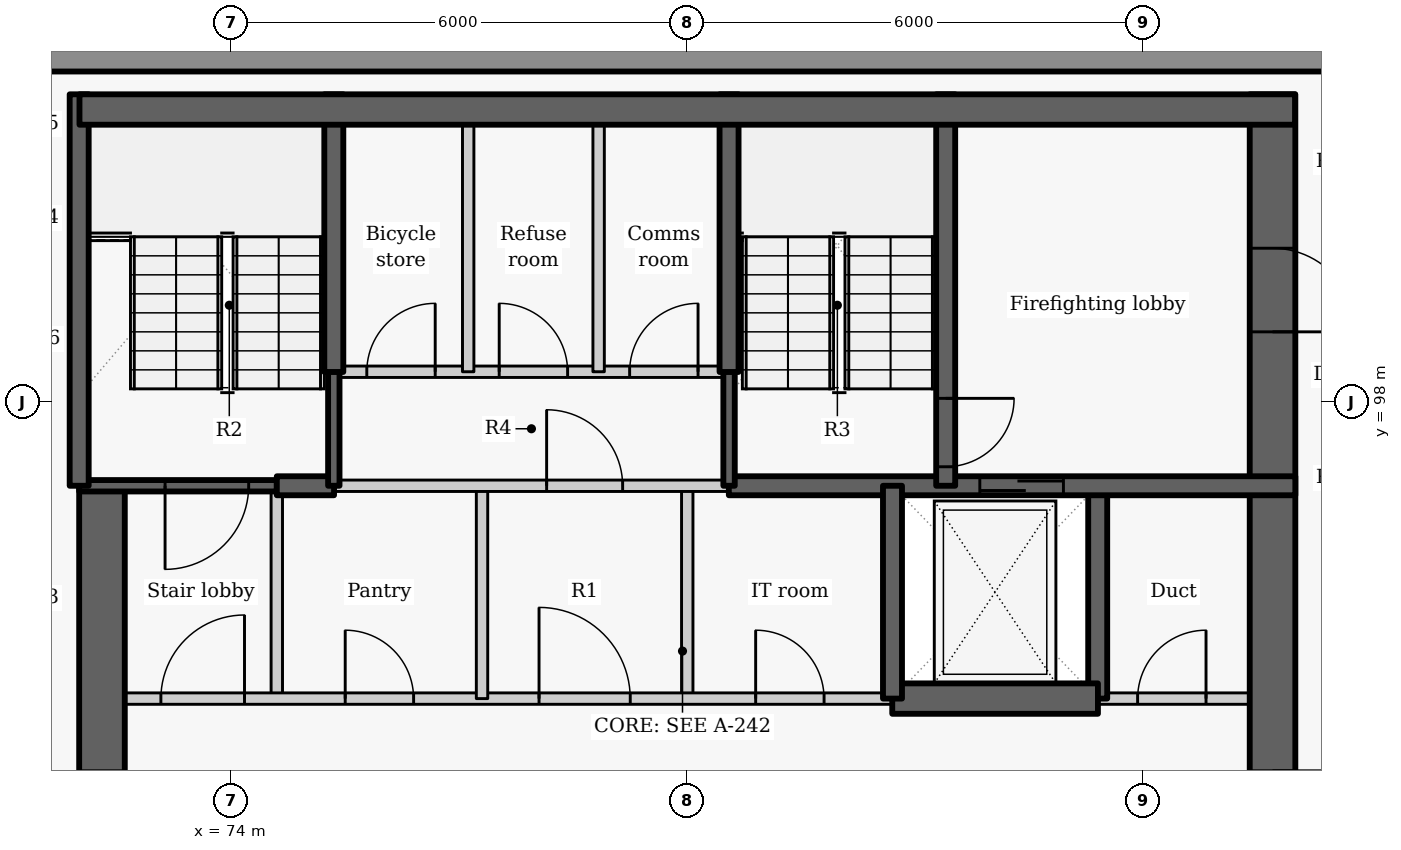
"""IFC4 building model, lengths in metres.
Left out: names, types, materials, properties, quantities, classifications, styles, units other than length and angle.
Written with IfcOpenShell. Run it as: python <this file> out.ifc"""

import sys

from ifc_helpers import new_model, si_unit, direction, frame, frame_2d, origin, place, context, subcontext, project, spatial, rectangle, extrude, element, fill, save


model = new_model("IFC4")
c1 = context("Model", 3, precision=1e-05, world=origin(), true_north=direction((0.0, 1.0)))
c2 = subcontext(c1, "Body", "Model", "MODEL_VIEW")
j1 = project(units=[si_unit("LENGTHUNIT", "METRE"), si_unit("PLANEANGLEUNIT", "RADIAN")], contexts=[c1])
p1 = place(None, origin())
s1 = spatial("IfcSite", under=j1, at=p1, CompositionType="ELEMENT")
p2 = place(p1, origin())
s2 = spatial("IfcBuilding", under=s1, at=p2, CompositionType="ELEMENT")
p3 = place(p2, frame((0.0, 0.0, 249.3)))
s3 = spatial("IfcBuildingStorey", under=s2, at=p3, CompositionType="ELEMENT", Elevation=249.3)
p4 = place(p3, frame((89.499, 102.5, 0.0), z_axis=(0.0, 0.0, 1.0), x_axis=(-1.0, 0.0, 0.0)))
e1 = element("IfcWall", 1, at=p4, inside=s3, PredefinedType="SOLIDWALL", context=c2, shape_type="SweptSolid", body=[
    extrude(rectangle(XDim=19.033, YDim=0.3, at=frame_2d((9.517, 0.0))), origin(), (0.0, 0.0, 1.0), 2.425),
])
p5 = place(p3, frame((74.6, 94.1, 0.0), z_axis=(0.0, 0.0, 1.0), x_axis=(0.0, 1.0, 0.0)))
e2 = element("IfcWall", 2, at=p5, inside=s3, PredefinedType="PARTITIONING", context=c2, shape_type="SweptSolid", body=[
    extrude(rectangle(XDim=2.8, YDim=0.15, at=frame_2d((1.4, 0.0))), origin(), (0.0, 0.0, 1.0), 3.025),
])
p6 = place(p3, frame((72.3, 87.8, -0.275), z_axis=(0.0, 0.0, 1.0), x_axis=(0.0, 1.0, 0.0)))
e3 = element("IfcWall", 3, at=p6, inside=s3, PredefinedType="SHEAR", context=c2, shape_type="SweptSolid", body=[
    extrude(rectangle(XDim=9.1, YDim=0.6, at=frame_2d((4.55, 0.0))), origin(), (0.0, 0.0, 1.0), 3.3),
])
p7 = place(p6, frame((3.85, 0.0, 0.275)))
e4 = element("IfcOpeningElement", 4, at=p7, cuts=e3, PredefinedType="OPENING", context=c2, shape_type="SweptSolid", body=[
    extrude(rectangle(XDim=1.5, YDim=2.1, at=frame_2d((0.75, 1.05))), frame((0.0, 0.31, 0.0), z_axis=(0.0, -1.0, 0.0), x_axis=(1.0, 0.0, 0.0)), (0.0, 0.0, 1.0), 0.62),
])
p8 = place(p3, frame((85.4, 94.1, -0.275), z_axis=(0.0, 0.0, 1.0), x_axis=(0.0, 1.0, 0.0)))
e5 = element("IfcWall", 5, at=p8, inside=s3, PredefinedType="SHEAR", context=c2, shape_type="SweptSolid", body=[
    extrude(rectangle(XDim=2.8, YDim=0.25, at=frame_2d((1.4, 0.0))), origin(), (0.0, 0.0, 1.0), 3.3),
])
p9 = place(p3, frame((87.7, 102.05, -0.275), z_axis=(0.0, 0.0, 1.0), x_axis=(0.0, -1.0, 0.0)))
e6 = element("IfcWall", 6, at=p9, inside=s3, PredefinedType="SHEAR", context=c2, shape_type="SweptSolid", body=[
    extrude(rectangle(XDim=14.25, YDim=0.6, at=frame_2d((7.125, 0.0))), origin(), (0.0, 0.0, 1.0), 3.3),
])
p10 = place(p9, frame((8.9, 0.0, 0.275)))
e7 = element("IfcOpeningElement", 7, at=p10, cuts=e6, PredefinedType="OPENING", context=c2, shape_type="SweptSolid", body=[
    extrude(rectangle(XDim=1.5, YDim=2.1, at=frame_2d((0.75, 1.05))), frame((0.0, 0.31, 0.0), z_axis=(0.0, -1.0, 0.0), x_axis=(1.0, 0.0, 0.0)), (0.0, 0.0, 1.0), 0.62),
])
p11 = place(p9, frame((2.025, 0.0, 0.275)))
e8 = element("IfcOpeningElement", 8, at=p11, cuts=e6, PredefinedType="OPENING", context=c2, shape_type="SweptSolid", body=[
    extrude(rectangle(XDim=1.1, YDim=2.1, at=frame_2d((0.55, 1.05))), frame((0.0, 0.31, 0.0), z_axis=(0.0, -1.0, 0.0), x_axis=(1.0, 0.0, 0.0)), (0.0, 0.0, 1.0), 0.62),
])
p12 = place(p3, frame((80.0, 94.1, 0.0), z_axis=(0.0, 0.0, 1.0), x_axis=(0.0, 1.0, 0.0)))
e9 = element("IfcWall", 9, at=p12, inside=s3, PredefinedType="PARTITIONING", context=c2, shape_type="SweptSolid", body=[
    extrude(rectangle(XDim=2.8, YDim=0.15, at=frame_2d((1.4, 0.0))), origin(), (0.0, 0.0, 1.0), 3.025),
])
p13 = place(p3, frame((72.0, 94.1, 0.0), z_axis=(0.0, 0.0, 1.0), x_axis=(1.0, 0.0, 0.0)))
e10 = element("IfcWall", 10, at=p13, inside=s3, PredefinedType="PARTITIONING", context=c2, shape_type="SweptSolid", body=[
    extrude(rectangle(XDim=10.703, YDim=0.15, at=frame_2d((5.352, 0.0))), origin(), (0.0, 0.0, 1.0), 3.025),
])
p14 = place(p13, frame((1.075, 0.0, 0.0)))
e11 = element("IfcOpeningElement", 11, at=p14, cuts=e10, PredefinedType="OPENING", context=c2, shape_type="SweptSolid", body=[
    extrude(rectangle(XDim=1.1, YDim=2.1, at=frame_2d((0.55, 1.05))), frame((0.0, 0.085, 0.0), z_axis=(0.0, -1.0, 0.0), x_axis=(1.0, 0.0, 0.0)), (0.0, 0.0, 1.0), 0.17),
])
p15 = place(p13, frame((3.5, 0.0, 0.0)))
e12 = element("IfcOpeningElement", 12, at=p15, cuts=e10, PredefinedType="OPENING", context=c2, shape_type="SweptSolid", body=[
    extrude(rectangle(XDim=0.9, YDim=2.1, at=frame_2d((0.45, 1.05))), frame((0.0, 0.085, 0.0), z_axis=(0.0, -1.0, 0.0), x_axis=(1.0, 0.0, 0.0)), (0.0, 0.0, 1.0), 0.17),
])
p16 = place(p13, frame((6.05, 0.0, 0.0)))
e13 = element("IfcOpeningElement", 13, at=p16, cuts=e10, PredefinedType="OPENING", context=c2, shape_type="SweptSolid", body=[
    extrude(rectangle(XDim=1.2, YDim=2.1, at=frame_2d((0.6, 1.05))), frame((0.0, 0.085, 0.0), z_axis=(0.0, -1.0, 0.0), x_axis=(1.0, 0.0, 0.0)), (0.0, 0.0, 1.0), 0.17),
])
p17 = place(p13, frame((8.9, 0.0, 0.0)))
e14 = element("IfcOpeningElement", 14, at=p17, cuts=e10, PredefinedType="OPENING", context=c2, shape_type="SweptSolid", body=[
    extrude(rectangle(XDim=0.9, YDim=2.1, at=frame_2d((0.45, 1.05))), frame((0.0, 0.085, 0.0), z_axis=(0.0, -1.0, 0.0), x_axis=(1.0, 0.0, 0.0)), (0.0, 0.0, 1.0), 0.17),
])
p18 = place(p3, frame((85.397, 94.1, 0.0), z_axis=(0.0, 0.0, 1.0), x_axis=(1.0, 0.0, 0.0)))
e15 = element("IfcWall", 15, at=p18, inside=s3, PredefinedType="PARTITIONING", context=c2, shape_type="SweptSolid", body=[
    extrude(rectangle(XDim=2.603, YDim=0.15, at=frame_2d((1.302, 0.0))), origin(), (0.0, 0.0, 1.0), 3.025),
])
p19 = place(p18, frame((0.528, 0.0, 0.0)))
e16 = element("IfcOpeningElement", 16, at=p19, cuts=e15, PredefinedType="OPENING", context=c2, shape_type="SweptSolid", body=[
    extrude(rectangle(XDim=0.9, YDim=2.1, at=frame_2d((0.45, 1.05))), frame((0.0, 0.085, 0.0), z_axis=(0.0, -1.0, 0.0), x_axis=(1.0, 0.0, 0.0)), (0.0, 0.0, 1.0), 0.17),
])
p20 = place(p3, frame((82.697, 94.1, -0.275), z_axis=(0.0, 0.0, 1.0), x_axis=(1.0, 0.0, 0.0)))
e17 = element("IfcWall", 17, at=p20, inside=s3, PredefinedType="SHEAR", context=c2, shape_type="SweptSolid", body=[
    extrude(rectangle(XDim=2.706, YDim=0.4, at=frame_2d((1.353, 0.0))), origin(), (0.0, 0.0, 1.0), 3.3),
])
p21 = place(p3, frame((74.6, 96.9, -0.275), z_axis=(0.0, 0.0, 1.0), x_axis=(-1.0, 0.0, 0.0)))
e18 = element("IfcWall", 18, at=p21, inside=s3, PredefinedType="SHEAR", context=c2, shape_type="SweptSolid", body=[
    extrude(rectangle(XDim=2.6, YDim=0.15, at=frame_2d((1.3, 0.0))), origin(), (0.0, 0.0, 1.0), 3.3),
])
p22 = place(p21, frame((0.37, 0.0, 0.275)))
e19 = element("IfcOpeningElement", 19, at=p22, cuts=e18, PredefinedType="OPENING", context=c2, shape_type="SweptSolid", body=[
    extrude(rectangle(XDim=1.1, YDim=2.1, at=frame_2d((0.55, 1.05))), frame((0.0, 0.085, 0.0), z_axis=(0.0, -1.0, 0.0), x_axis=(1.0, 0.0, 0.0)), (0.0, 0.0, 1.0), 0.17),
])
p23 = place(p3, frame((77.3, 94.1, 0.0), z_axis=(0.0, 0.0, 1.0), x_axis=(0.0, 1.0, 0.0)))
e20 = element("IfcWall", 20, at=p23, inside=s3, PredefinedType="PARTITIONING", context=c2, shape_type="SweptSolid", body=[
    extrude(rectangle(XDim=2.8, YDim=0.15, at=frame_2d((1.4, 0.0))), origin(), (0.0, 0.0, 1.0), 3.025),
])
p24 = place(p3, frame((74.6, 96.9, -0.275), z_axis=(0.0, 0.0, 1.0), x_axis=(1.0, 0.0, 0.0)))
e21 = element("IfcWall", 21, at=p24, inside=s3, PredefinedType="SHEAR", context=c2, shape_type="SweptSolid", body=[
    extrude(rectangle(XDim=0.753, YDim=0.25, at=frame_2d((0.376, 0.0))), origin(), (0.0, 0.0, 1.0), 3.3),
])
p25 = place(p3, frame((80.547, 96.9, -0.275), z_axis=(0.0, 0.0, 1.0), x_axis=(1.0, 0.0, 0.0)))
e22 = element("IfcWall", 22, at=p25, inside=s3, PredefinedType="SHEAR", context=c2, shape_type="SweptSolid", body=[
    extrude(rectangle(XDim=7.453, YDim=0.25, at=frame_2d((3.727, 0.0))), origin(), (0.0, 0.0, 1.0), 3.3),
])
p26 = place(p25, frame((3.302, 0.0, 0.275)))
e23 = element("IfcOpeningElement", 23, at=p26, cuts=e22, PredefinedType="OPENING", context=c2, shape_type="SweptSolid", body=[
    extrude(rectangle(XDim=1.1, YDim=2.1, at=frame_2d((0.55, 1.05))), frame((0.0, 0.135, 0.0), z_axis=(0.0, -1.0, 0.0), x_axis=(1.0, 0.0, 0.0)), (0.0, 0.0, 1.0), 0.27),
])
p27 = place(p3, frame((75.347, 96.9, 0.0), z_axis=(0.0, 0.0, 1.0), x_axis=(1.0, 0.0, 0.0)))
e24 = element("IfcWall", 24, at=p27, inside=s3, PredefinedType="PARTITIONING", context=c2, shape_type="SweptSolid", body=[
    extrude(rectangle(XDim=5.206, YDim=0.15, at=frame_2d((2.603, 0.0))), origin(), (0.0, 0.0, 1.0), 3.025),
])
p28 = place(p27, frame((2.803, 0.0, 0.0)))
e25 = element("IfcOpeningElement", 25, at=p28, cuts=e24, PredefinedType="OPENING", context=c2, shape_type="SweptSolid", body=[
    extrude(rectangle(XDim=1.0, YDim=2.1, at=frame_2d((0.5, 1.05))), frame((0.0, 0.085, 0.0), z_axis=(0.0, -1.0, 0.0), x_axis=(1.0, 0.0, 0.0)), (0.0, 0.0, 1.0), 0.17),
])
p29 = place(p3, frame((82.7, 94.1, -0.275), z_axis=(0.0, 0.0, 1.0), x_axis=(0.0, 1.0, 0.0)))
e26 = element("IfcWall", 26, at=p29, inside=s3, PredefinedType="SHEAR", context=c2, shape_type="SweptSolid", body=[
    extrude(rectangle(XDim=2.8, YDim=0.25, at=frame_2d((1.4, 0.0))), origin(), (0.0, 0.0, 1.0), 3.3),
])
p30 = place(p3, frame((75.35, 96.9, -0.275), z_axis=(0.0, 0.0, 1.0), x_axis=(0.0, 1.0, 0.0)))
e27 = element("IfcWall", 27, at=p30, inside=s3, PredefinedType="SHEAR", context=c2, shape_type="SweptSolid", body=[
    extrude(rectangle(XDim=1.503, YDim=0.15, at=frame_2d((0.751, 0.0))), origin(), (0.0, 0.0, 1.0), 3.3),
])
p31 = place(p3, frame((75.35, 98.397, -0.275), z_axis=(0.0, 0.0, 1.0), x_axis=(0.0, 1.0, 0.0)))
e28 = element("IfcWall", 28, at=p31, inside=s3, PredefinedType="SHEAR", context=c2, shape_type="SweptSolid", body=[
    extrude(rectangle(XDim=3.653, YDim=0.25, at=frame_2d((1.827, 0.0))), origin(), (0.0, 0.0, 1.0), 3.3),
])
p32 = place(p3, frame((72.0, 96.9, -0.275), z_axis=(0.0, 0.0, 1.0), x_axis=(0.0, 1.0, 0.0)))
e29 = element("IfcWall", 29, at=p32, inside=s3, PredefinedType="SHEAR", context=c2, shape_type="SweptSolid", body=[
    extrude(rectangle(XDim=5.15, YDim=0.25, at=frame_2d((2.575, 0.0))), origin(), (0.0, 0.0, 1.0), 3.3),
])
p33 = place(p3, frame((83.4, 102.05, -0.275), z_axis=(0.0, 0.0, 1.0), x_axis=(0.0, -1.0, 0.0)))
e30 = element("IfcWall", 30, at=p33, inside=s3, PredefinedType="SHEAR", context=c2, shape_type="SweptSolid", body=[
    extrude(rectangle(XDim=5.15, YDim=0.25, at=frame_2d((2.575, 0.0))), origin(), (0.0, 0.0, 1.0), 3.3),
])
p34 = place(p33, frame((4.0, 0.0, 0.275)))
e31 = element("IfcOpeningElement", 31, at=p34, cuts=e30, PredefinedType="OPENING", context=c2, shape_type="SweptSolid", body=[
    extrude(rectangle(XDim=0.9, YDim=2.1, at=frame_2d((0.45, 1.05))), frame((0.0, 0.135, 0.0), z_axis=(0.0, -1.0, 0.0), x_axis=(1.0, 0.0, 0.0)), (0.0, 0.0, 1.0), 0.27),
])
p35 = place(p3, frame((80.55, 96.9, -0.275), z_axis=(0.0, 0.0, 1.0), x_axis=(0.0, 1.0, 0.0)))
e32 = element("IfcWall", 32, at=p35, inside=s3, PredefinedType="SHEAR", context=c2, shape_type="SweptSolid", body=[
    extrude(rectangle(XDim=1.503, YDim=0.15, at=frame_2d((0.751, 0.0))), origin(), (0.0, 0.0, 1.0), 3.3),
])
p36 = place(p3, frame((80.55, 98.397, -0.275), z_axis=(0.0, 0.0, 1.0), x_axis=(0.0, 1.0, 0.0)))
e33 = element("IfcWall", 33, at=p36, inside=s3, PredefinedType="SHEAR", context=c2, shape_type="SweptSolid", body=[
    extrude(rectangle(XDim=3.653, YDim=0.25, at=frame_2d((1.827, 0.0))), origin(), (0.0, 0.0, 1.0), 3.3),
])
p37 = place(p3, frame((75.35, 98.4, 0.0), z_axis=(0.0, 0.0, 1.0), x_axis=(1.0, 0.0, 0.0)))
e34 = element("IfcWall", 34, at=p37, inside=s3, PredefinedType="PARTITIONING", context=c2, shape_type="SweptSolid", body=[
    extrude(rectangle(XDim=5.2, YDim=0.15, at=frame_2d((2.6, 0.0))), origin(), (0.0, 0.0, 1.0), 3.025),
])
p38 = place(p37, frame((0.434, 0.0, 0.0)))
e35 = element("IfcOpeningElement", 35, at=p38, cuts=e34, PredefinedType="OPENING", context=c2, shape_type="SweptSolid", body=[
    extrude(rectangle(XDim=0.9, YDim=2.1, at=frame_2d((0.45, 1.05))), frame((0.0, 0.085, 0.0), z_axis=(0.0, -1.0, 0.0), x_axis=(1.0, 0.0, 0.0)), (0.0, 0.0, 1.0), 0.17),
])
p39 = place(p37, frame((2.176, 0.0, 0.0)))
e36 = element("IfcOpeningElement", 36, at=p39, cuts=e34, PredefinedType="OPENING", context=c2, shape_type="SweptSolid", body=[
    extrude(rectangle(XDim=0.9, YDim=2.1, at=frame_2d((0.45, 1.05))), frame((0.0, 0.085, 0.0), z_axis=(0.0, -1.0, 0.0), x_axis=(1.0, 0.0, 0.0)), (0.0, 0.0, 1.0), 0.17),
])
p40 = place(p37, frame((3.892, 0.0, 0.0)))
e37 = element("IfcOpeningElement", 37, at=p40, cuts=e34, PredefinedType="OPENING", context=c2, shape_type="SweptSolid", body=[
    extrude(rectangle(XDim=0.9, YDim=2.1, at=frame_2d((0.45, 1.05))), frame((0.0, 0.085, 0.0), z_axis=(0.0, -1.0, 0.0), x_axis=(1.0, 0.0, 0.0)), (0.0, 0.0, 1.0), 0.17),
])
for number, where, z_axis, x_axis in (
    (38, (77.118, 98.4, 0.0), (0.0, 0.0, 1.0), (0.0, 1.0, 0.0)),
    (39, (78.834, 98.4, 0.0), (0.0, 0.0, 1.0), (0.0, 1.0, 0.0)),
):
    element("IfcWall", number, at=place(p3, frame(where, z_axis=z_axis, x_axis=x_axis)), inside=s3, PredefinedType="PARTITIONING", context=c2, shape_type="SweptSolid", body=[
        extrude(rectangle(XDim=3.65, YDim=0.15, at=frame_2d((1.825, 0.0))), origin(), (0.0, 0.0, 1.0), 3.025),
    ])
p41 = place(p3, frame((72.004, 101.85, -0.275), z_axis=(0.0, 0.0, 1.0), x_axis=(1.0, 0.0, 0.0)))
e40 = element("IfcWall", 40, at=p41, inside=s3, PredefinedType="SHEAR", context=c2, shape_type="SweptSolid", body=[
    extrude(rectangle(XDim=15.992, YDim=0.4, at=frame_2d((7.996, 0.0))), origin(), (0.0, 0.0, 1.0), 3.3),
])
p42 = place(p14, origin())
e41 = element("IfcDoor", 41, at=p42, inside=s3, OperationType="SINGLE_SWING_RIGHT", PredefinedType="DOOR", context=c2, shape_type="SweptSolid", body=[
    extrude(rectangle(XDim=1.1, YDim=2.1, at=frame_2d((0.55, 1.05))), frame((0.0, 0.025, 0.0), z_axis=(0.0, -1.0, 0.0), x_axis=(1.0, 0.0, 0.0)), (0.0, 0.0, 1.0), 0.05),
])
fill(e11, e41)
p43 = place(p15, origin())
e42 = element("IfcDoor", 42, at=p43, inside=s3, OperationType="SINGLE_SWING_LEFT", PredefinedType="DOOR", context=c2, shape_type="SweptSolid", body=[
    extrude(rectangle(XDim=0.9, YDim=2.1, at=frame_2d((0.45, 1.05))), frame((0.0, 0.025, 0.0), z_axis=(0.0, -1.0, 0.0), x_axis=(1.0, 0.0, 0.0)), (0.0, 0.0, 1.0), 0.05),
])
fill(e12, e42)
p44 = place(p16, origin())
e43 = element("IfcDoor", 43, at=p44, inside=s3, OperationType="DOUBLE_DOOR_SINGLE_SWING", PredefinedType="DOOR", context=c2, shape_type="SweptSolid", body=[
    extrude(rectangle(XDim=1.2, YDim=2.1, at=frame_2d((0.6, 1.05))), frame((0.0, 0.025, 0.0), z_axis=(0.0, -1.0, 0.0), x_axis=(1.0, 0.0, 0.0)), (0.0, 0.0, 1.0), 0.05),
])
fill(e13, e43)
p45 = place(p17, origin())
e44 = element("IfcDoor", 44, at=p45, inside=s3, OperationType="SINGLE_SWING_LEFT", PredefinedType="DOOR", context=c2, shape_type="SweptSolid", body=[
    extrude(rectangle(XDim=0.9, YDim=2.1, at=frame_2d((0.45, 1.05))), frame((0.0, 0.025, 0.0), z_axis=(0.0, -1.0, 0.0), x_axis=(1.0, 0.0, 0.0)), (0.0, 0.0, 1.0), 0.05),
])
fill(e14, e44)
p46 = place(p26, origin())
e45 = element("IfcDoor", 45, at=p46, inside=s3, OperationType="SLIDING_TO_LEFT", PredefinedType="DOOR", context=c2, shape_type="SweptSolid", body=[
    extrude(rectangle(XDim=1.1, YDim=2.1, at=frame_2d((0.55, 1.05))), frame((0.0, 0.025, 0.0), z_axis=(0.0, -1.0, 0.0), x_axis=(1.0, 0.0, 0.0)), (0.0, 0.0, 1.0), 0.05),
])
fill(e23, e45)
p47 = place(p19, origin())
e46 = element("IfcDoor", 46, at=p47, inside=s3, OperationType="SINGLE_SWING_RIGHT", PredefinedType="DOOR", context=c2, shape_type="SweptSolid", body=[
    extrude(rectangle(XDim=0.9, YDim=2.1, at=frame_2d((0.45, 1.05))), frame((0.0, 0.025, 0.0), z_axis=(0.0, -1.0, 0.0), x_axis=(1.0, 0.0, 0.0)), (0.0, 0.0, 1.0), 0.05),
])
fill(e16, e46)
p48 = place(p28, origin())
e47 = element("IfcDoor", 47, at=p48, inside=s3, OperationType="SINGLE_SWING_LEFT", PredefinedType="DOOR", context=c2, shape_type="SweptSolid", body=[
    extrude(rectangle(XDim=1.0, YDim=2.1, at=frame_2d((0.5, 1.05))), frame((0.0, 0.025, 0.0), z_axis=(0.0, -1.0, 0.0), x_axis=(1.0, 0.0, 0.0)), (0.0, 0.0, 1.0), 0.05),
])
fill(e25, e47)
p49 = place(p38, origin())
e48 = element("IfcDoor", 48, at=p49, inside=s3, OperationType="SINGLE_SWING_RIGHT", PredefinedType="DOOR", context=c2, shape_type="SweptSolid", body=[
    extrude(rectangle(XDim=0.9, YDim=2.1, at=frame_2d((0.45, 1.05))), frame((0.0, 0.025, 0.0), z_axis=(0.0, -1.0, 0.0), x_axis=(1.0, 0.0, 0.0)), (0.0, 0.0, 1.0), 0.05),
])
fill(e35, e48)
p50 = place(p39, origin())
e49 = element("IfcDoor", 49, at=p50, inside=s3, OperationType="SINGLE_SWING_LEFT", PredefinedType="DOOR", context=c2, shape_type="SweptSolid", body=[
    extrude(rectangle(XDim=0.9, YDim=2.1, at=frame_2d((0.45, 1.05))), frame((0.0, 0.025, 0.0), z_axis=(0.0, -1.0, 0.0), x_axis=(1.0, 0.0, 0.0)), (0.0, 0.0, 1.0), 0.05),
])
fill(e36, e49)
p51 = place(p40, origin())
e50 = element("IfcDoor", 50, at=p51, inside=s3, OperationType="SINGLE_SWING_RIGHT", PredefinedType="DOOR", context=c2, shape_type="SweptSolid", body=[
    extrude(rectangle(XDim=0.9, YDim=2.1, at=frame_2d((0.45, 1.05))), frame((0.0, 0.025, 0.0), z_axis=(0.0, -1.0, 0.0), x_axis=(1.0, 0.0, 0.0)), (0.0, 0.0, 1.0), 0.05),
])
fill(e37, e50)
p52 = place(p22, origin())
e51 = element("IfcDoor", 51, at=p52, inside=s3, OperationType="SINGLE_SWING_RIGHT", PredefinedType="DOOR", context=c2, shape_type="SweptSolid", body=[
    extrude(rectangle(XDim=1.1, YDim=2.1, at=frame_2d((0.55, 1.05))), frame((0.0, 0.025, 0.0), z_axis=(0.0, -1.0, 0.0), x_axis=(1.0, 0.0, 0.0)), (0.0, 0.0, 1.0), 0.05),
])
fill(e19, e51)
p53 = place(p34, origin())
e52 = element("IfcDoor", 52, at=p53, inside=s3, OperationType="SINGLE_SWING_LEFT", PredefinedType="DOOR", context=c2, shape_type="SweptSolid", body=[
    extrude(rectangle(XDim=0.9, YDim=2.1, at=frame_2d((0.45, 1.05))), frame((0.0, 0.025, 0.0), z_axis=(0.0, -1.0, 0.0), x_axis=(1.0, 0.0, 0.0)), (0.0, 0.0, 1.0), 0.05),
])
fill(e31, e52)
p54 = place(p10, origin())
e53 = element("IfcDoor", 53, at=p54, inside=s3, OperationType="DOUBLE_DOOR_SINGLE_SWING", PredefinedType="DOOR", context=c2, shape_type="SweptSolid", body=[
    extrude(rectangle(XDim=1.5, YDim=2.1, at=frame_2d((0.75, 1.05))), frame((0.0, 0.025, 0.0), z_axis=(0.0, -1.0, 0.0), x_axis=(1.0, 0.0, 0.0)), (0.0, 0.0, 1.0), 0.05),
])
fill(e7, e53)
p55 = place(p7, origin())
e54 = element("IfcDoor", 54, at=p55, inside=s3, OperationType="DOUBLE_DOOR_SINGLE_SWING", PredefinedType="DOOR", context=c2, shape_type="SweptSolid", body=[
    extrude(rectangle(XDim=1.5, YDim=2.1, at=frame_2d((0.75, 1.05))), frame((0.0, 0.025, 0.0), z_axis=(0.0, -1.0, 0.0), x_axis=(1.0, 0.0, 0.0)), (0.0, 0.0, 1.0), 0.05),
])
fill(e4, e54)
p56 = place(p11, origin())
e55 = element("IfcDoor", 55, at=p56, inside=s3, OperationType="SINGLE_SWING_RIGHT", PredefinedType="DOOR", context=c2, shape_type="SweptSolid", body=[
    extrude(rectangle(XDim=1.1, YDim=2.1, at=frame_2d((0.55, 1.05))), frame((0.0, 0.025, 0.0), z_axis=(0.0, -1.0, 0.0), x_axis=(1.0, 0.0, 0.0)), (0.0, 0.0, 1.0), 0.05),
])
fill(e8, e55)
save(model, sys.argv[1])
